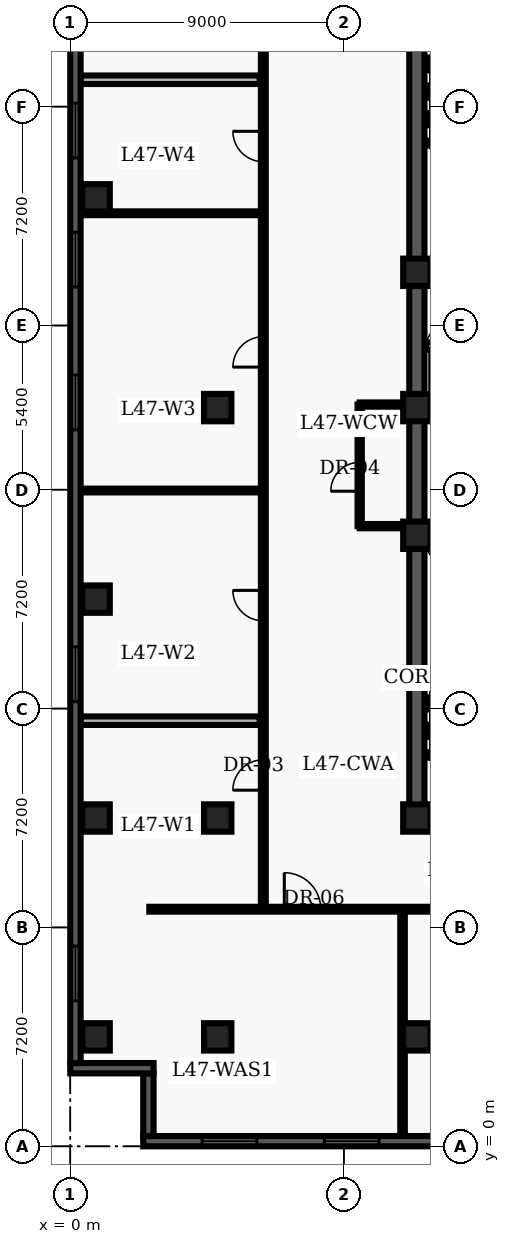
"""IFC4 building model, lengths in metres.
Left out: names, types, materials, properties, quantities, classifications, styles, units other than length and angle.
Written with IfcOpenShell. Run it as: python <this file> out.ifc"""

import sys

from ifc_helpers import new_model, entity, si_unit, converted_unit, direction, frame, origin_with_axes, origin_2d_with_axis, place, context, subcontext, project, spatial, polyline, rectangle, outline, extrude, element, fill, save


model = new_model("IFC4")
c1 = context("Model", 3, precision=1e-05, world=origin_with_axes(), true_north=direction((0.0, 1.0)))
c2 = subcontext(c1, "Body", "Model", "MODEL_VIEW")
j1 = project(units=[si_unit("LENGTHUNIT", "METRE"), converted_unit("PLANEANGLEUNIT", "DEGREE", entity("IfcPlaneAngleMeasure", 0.017), si_unit("PLANEANGLEUNIT", "RADIAN"), dimensions=[0, 0, 0, 0, 0, 0, 0])], contexts=[c1])
p1 = place(None, origin_with_axes())
s1 = spatial("IfcSite", under=j1, at=p1, CompositionType="ELEMENT")
p2 = place(p1, origin_with_axes())
s2 = spatial("IfcBuilding", under=s1, at=p2, CompositionType="ELEMENT")
p3 = place(p2, frame((0.0, 0.0, 192.6), z_axis=(0.0, 0.0, 1.0), x_axis=(1.0, 0.0, 0.0)))
s3 = spatial("IfcBuildingStorey", under=s2, at=p3, CompositionType="ELEMENT", Elevation=192.6)
p4 = place(p3, frame((11.4, 10.8, 0.0), z_axis=(0.0, 0.0, 1.0), x_axis=(0.0, 1.0, 0.0)))
e1 = element("IfcWall", 1, at=p4, inside=s3, PredefinedType="SHEAR", context=c2, shape_type="SweptSolid", body=[
    extrude(outline(polyline([(0.0, -0.25), (27.0, -0.25), (27.0, 0.25), (0.0, 0.25), (0.0, -0.25)])), origin_with_axes(), (0.0, 0.0, 1.0), 3.66),
])
p5 = place(p3, frame((11.4, 10.8, 0.0), z_axis=(0.0, 0.0, 1.0), x_axis=(1.0, 0.0, 0.0)))
e2 = element("IfcWall", 2, at=p5, inside=s3, PredefinedType="SHEAR", context=c2, shape_type="SweptSolid", body=[
    extrude(outline(polyline([(0.0, -0.25), (7.2, -0.25), (7.2, 0.25), (0.0, 0.25), (0.0, -0.25)])), origin_with_axes(), (0.0, 0.0, 1.0), 3.66),
])
p6 = place(p5, frame((2.625, 0.0, 0.0), z_axis=(0.0, 0.0, 1.0), x_axis=(1.0, 0.0, 0.0)))
e3 = element("IfcOpeningElement", 3, at=p6, cuts=e2, PredefinedType="OPENING", context=c2, shape_type="SweptSolid", body=[
    extrude(rectangle(XDim=1.05, YDim=0.52, at=origin_2d_with_axis()), origin_with_axes(), (0.0, 0.0, 1.0), 2.15),
])
for number, where, z_axis, x_axis in (
    (4, (11.65, 19.825, 0.0), (0.0, 0.0, 1.0), (1.0, 0.0, 0.0)),
    (5, (11.65, 28.775, 0.0), (0.0, 0.0, 1.0), (1.0, 0.0, 0.0)),
):
    element("IfcWall", number, at=place(p3, frame(where, z_axis=z_axis, x_axis=x_axis)), inside=s3, PredefinedType="SHEAR", context=c2, shape_type="SweptSolid", body=[
        extrude(outline(polyline([(0.0, -0.125), (6.7, -0.125), (6.7, 0.125), (0.0, 0.125), (0.0, -0.125)])), origin_with_axes(), (0.0, 0.0, 1.0), 3.66),
    ])
p7 = place(p3, frame((11.7, 24.1, 0.0), z_axis=(0.0, 0.0, 1.0), x_axis=(1.0, 0.0, 0.0)))
e6 = element("IfcWall", 6, at=p7, inside=s3, PredefinedType="SOLIDWALL", context=c2, shape_type="SweptSolid", body=[
    extrude(outline(polyline([(0.0, -0.125), (6.6, -0.125), (6.6, 0.125), (0.0, 0.125), (0.0, -0.125)])), origin_with_axes(), (0.0, 0.0, 1.0), 2.7),
])
p8 = place(p7, frame((3.75, 0.0, 0.0), z_axis=(0.0, 0.0, 1.0), x_axis=(1.0, 0.0, 0.0)))
e7 = element("IfcOpeningElement", 7, at=p8, cuts=e6, PredefinedType="OPENING", context=c2, shape_type="SweptSolid", body=[
    extrude(rectangle(XDim=0.9, YDim=0.27, at=origin_2d_with_axis()), origin_with_axes(), (0.0, 0.0, 1.0), 2.15),
])
p9 = place(p3, frame((11.7, 26.325, 0.0), z_axis=(0.0, 0.0, 1.0), x_axis=(1.0, 0.0, 0.0)))
e8 = element("IfcWall", 8, at=p9, inside=s3, PredefinedType="SOLIDWALL", context=c2, shape_type="SweptSolid", body=[
    extrude(outline(polyline([(0.0, -0.125), (6.6, -0.125), (6.6, 0.125), (0.0, 0.125), (0.0, -0.125)])), origin_with_axes(), (0.0, 0.0, 1.0), 2.7),
])
p10 = place(p9, frame((3.5, 0.0, 0.0), z_axis=(0.0, 0.0, 1.0), x_axis=(1.0, 0.0, 0.0)))
e9 = element("IfcOpeningElement", 9, at=p10, cuts=e8, PredefinedType="OPENING", context=c2, shape_type="SweptSolid", body=[
    extrude(rectangle(XDim=0.9, YDim=0.27, at=origin_2d_with_axis()), origin_with_axes(), (0.0, 0.0, 1.0), 2.15),
])
for number, where, z_axis, x_axis in (
    (10, (11.4, 3.6, 0.0), (0.0, 0.0, 1.0), (1.0, 0.0, 0.0)),
    (11, (11.4, 10.8, 0.0), (0.0, 0.0, 1.0), (1.0, 0.0, 0.0)),
    (12, (11.4, 20.1, 0.0), (0.0, 0.0, 1.0), (1.0, 0.0, 0.0)),
    (13, (11.4, 24.3, 0.0), (0.0, 0.0, 1.0), (1.0, 0.0, 0.0)),
    (14, (11.4, 28.75, 0.0), (0.0, 0.0, 1.0), (1.0, 0.0, 0.0)),
    (15, (4.85, 3.6, 0.0), (0.0, 0.0, 1.0), (1.0, 0.0, 0.0)),
    (16, (4.85, 10.8, 0.0), (0.0, 0.0, 1.0), (1.0, 0.0, 0.0)),
    (17, (4.85, 24.3, 0.0), (0.0, 0.0, 1.0), (1.0, 0.0, 0.0)),
    (18, (0.85, 3.6, 0.0), (0.0, 0.0, 1.0), (1.0, 0.0, 0.0)),
    (19, (0.85, 10.8, 0.0), (0.0, 0.0, 1.0), (1.0, 0.0, 0.0)),
    (20, (0.85, 18.0, 0.0), (0.0, 0.0, 1.0), (1.0, 0.0, 0.0)),
    (21, (0.85, 31.2, 0.0), (0.0, 0.0, 1.0), (1.0, 0.0, 0.0)),
):
    element("IfcColumn", number, at=place(p3, frame(where, z_axis=z_axis, x_axis=x_axis)), inside=s3, PredefinedType="COLUMN", context=c2, shape_type="SweptSolid", body=[
        extrude(rectangle(XDim=0.9, YDim=0.9, at=origin_2d_with_axis()), origin_with_axes(), (0.0, 0.0, 1.0), 3.9),
    ])
p11 = place(p3, frame((9.52, 20.4, 0.0), z_axis=(0.0, 0.0, 1.0), x_axis=(0.0, 1.0, 0.0)))
e22 = element("IfcWall", 22, at=p11, inside=s3, PredefinedType="PARTITIONING", context=c2, shape_type="SweptSolid", body=[
    extrude(outline(polyline([(0.0, -0.07), (4.0, -0.07), (4.0, 0.07), (0.0, 0.07), (0.0, -0.07)])), origin_with_axes(), (0.0, 0.0, 1.0), 2.7),
])
p12 = place(p11, frame((1.625, 0.0, 0.0), z_axis=(0.0, 0.0, 1.0), x_axis=(1.0, 0.0, 0.0)))
e23 = element("IfcOpeningElement", 23, at=p12, cuts=e22, PredefinedType="OPENING", context=c2, shape_type="SweptSolid", body=[
    extrude(rectangle(XDim=0.95, YDim=0.16, at=origin_2d_with_axis()), origin_with_axes(), (0.0, 0.0, 1.0), 2.15),
])
for number, where, z_axis, x_axis in (
    (24, (9.52, 20.4, 0.0), (0.0, 0.0, 1.0), (1.0, 0.0, 0.0)),
    (25, (9.52, 24.4, 0.0), (0.0, 0.0, 1.0), (1.0, 0.0, 0.0)),
):
    element("IfcWall", number, at=place(p3, frame(where, z_axis=z_axis, x_axis=x_axis)), inside=s3, PredefinedType="PARTITIONING", context=c2, shape_type="SweptSolid", body=[
        extrude(outline(polyline([(0.0, -0.07), (1.58, -0.07), (1.58, 0.07), (0.0, 0.07), (0.0, -0.07)])), origin_with_axes(), (0.0, 0.0, 1.0), 2.7),
    ])
p13 = place(p3, frame((2.6, 7.8, 0.0), z_axis=(0.0, 0.0, 1.0), x_axis=(1.0, 0.0, 0.0)))
e26 = element("IfcWall", 26, at=p13, inside=s3, PredefinedType="PARTITIONING", context=c2, shape_type="SweptSolid", body=[
    extrude(outline(polyline([(0.0, -0.08), (18.55, -0.08), (18.55, 0.08), (0.0, 0.08), (0.0, -0.08)])), origin_with_axes(), (0.0, 0.0, 1.0), 2.7),
])
p14 = place(p13, frame((5.04, 0.0, 0.0), z_axis=(0.0, 0.0, 1.0), x_axis=(1.0, 0.0, 0.0)))
e27 = element("IfcOpeningElement", 27, at=p14, cuts=e26, PredefinedType="OPENING", context=c2, shape_type="SweptSolid", body=[
    extrude(rectangle(XDim=1.2, YDim=0.18, at=origin_2d_with_axis()), origin_with_axes(), (0.0, 0.0, 1.0), 2.2),
])
p15 = place(p13, frame((13.415, 0.0, 0.0), z_axis=(0.0, 0.0, 1.0), x_axis=(1.0, 0.0, 0.0)))
e28 = element("IfcOpeningElement", 28, at=p15, cuts=e26, PredefinedType="OPENING", context=c2, shape_type="SweptSolid", body=[
    extrude(rectangle(XDim=1.0, YDim=0.18, at=origin_2d_with_axis()), origin_with_axes(), (0.0, 0.0, 1.0), 2.15),
])
p16 = place(p3, frame((6.35, 7.8, 0.0), z_axis=(0.0, 0.0, 1.0), x_axis=(0.0, 1.0, 0.0)))
e29 = element("IfcWall", 29, at=p16, inside=s3, PredefinedType="PARTITIONING", context=c2, shape_type="SweptSolid", body=[
    extrude(outline(polyline([(0.0, -0.08), (32.7, -0.08), (32.7, 0.08), (0.0, 0.08), (0.0, -0.08)])), origin_with_axes(), (0.0, 0.0, 1.0), 2.7),
])
p17 = place(p16, frame((4.415, 0.0, 0.0), z_axis=(0.0, 0.0, 1.0), x_axis=(1.0, 0.0, 0.0)))
e30 = element("IfcOpeningElement", 30, at=p17, cuts=e29, PredefinedType="OPENING", context=c2, shape_type="SweptSolid", body=[
    extrude(rectangle(XDim=1.0, YDim=0.18, at=origin_2d_with_axis()), origin_with_axes(), (0.0, 0.0, 1.0), 2.15),
])
p18 = place(p16, frame((9.986, 0.0, 0.0), z_axis=(0.0, 0.0, 1.0), x_axis=(1.0, 0.0, 0.0)))
e31 = element("IfcOpeningElement", 31, at=p18, cuts=e29, PredefinedType="OPENING", context=c2, shape_type="SweptSolid", body=[
    extrude(rectangle(XDim=1.0, YDim=0.18, at=origin_2d_with_axis()), origin_with_axes(), (0.0, 0.0, 1.0), 2.15),
])
p19 = place(p16, frame((18.332, 0.0, 0.0), z_axis=(0.0, 0.0, 1.0), x_axis=(1.0, 0.0, 0.0)))
e32 = element("IfcOpeningElement", 32, at=p19, cuts=e29, PredefinedType="OPENING", context=c2, shape_type="SweptSolid", body=[
    extrude(rectangle(XDim=1.0, YDim=0.18, at=origin_2d_with_axis()), origin_with_axes(), (0.0, 0.0, 1.0), 2.15),
])
p20 = place(p16, frame((25.088, 0.0, 0.0), z_axis=(0.0, 0.0, 1.0), x_axis=(1.0, 0.0, 0.0)))
e33 = element("IfcOpeningElement", 33, at=p20, cuts=e29, PredefinedType="OPENING", context=c2, shape_type="SweptSolid", body=[
    extrude(rectangle(XDim=1.0, YDim=0.18, at=origin_2d_with_axis()), origin_with_axes(), (0.0, 0.0, 1.0), 2.15),
])
p21 = place(p16, frame((31.177, 0.0, 0.0), z_axis=(0.0, 0.0, 1.0), x_axis=(1.0, 0.0, 0.0)))
e34 = element("IfcOpeningElement", 34, at=p21, cuts=e29, PredefinedType="OPENING", context=c2, shape_type="SweptSolid", body=[
    extrude(rectangle(XDim=1.0, YDim=0.18, at=origin_2d_with_axis()), origin_with_axes(), (0.0, 0.0, 1.0), 2.15),
])
p22 = place(p3, frame((0.335, 14.001, 0.0), z_axis=(0.0, 0.0, 1.0), x_axis=(1.0, 0.0, 0.0)))
e35 = element("IfcWall", 35, at=p22, inside=s3, PredefinedType="PARTITIONING", context=c2, shape_type="SweptSolid", body=[
    extrude(outline(polyline([(0.0, -0.14), (5.895, -0.14), (5.895, 0.14), (0.0, 0.14), (0.0, -0.14)])), origin_with_axes(), (0.0, 0.0, 1.0), 2.7),
])
for number, where, z_axis, x_axis in (
    (36, (0.335, 21.572, 0.0), (0.0, 0.0, 1.0), (1.0, 0.0, 0.0)),
    (37, (0.335, 30.692, 0.0), (0.0, 0.0, 1.0), (1.0, 0.0, 0.0)),
):
    element("IfcWall", number, at=place(p3, frame(where, z_axis=z_axis, x_axis=x_axis)), inside=s3, PredefinedType="PARTITIONING", context=c2, shape_type="SweptSolid", body=[
        extrude(outline(polyline([(0.0, -0.062), (5.895, -0.062), (5.895, 0.062), (0.0, 0.062), (0.0, -0.062)])), origin_with_axes(), (0.0, 0.0, 1.0), 2.7),
    ])
p23 = place(p3, frame((0.335, 35.084, 0.0), z_axis=(0.0, 0.0, 1.0), x_axis=(1.0, 0.0, 0.0)))
e38 = element("IfcWall", 38, at=p23, inside=s3, PredefinedType="PARTITIONING", context=c2, shape_type="SweptSolid", body=[
    extrude(outline(polyline([(0.0, -0.14), (5.895, -0.14), (5.895, 0.14), (0.0, 0.14), (0.0, -0.14)])), origin_with_axes(), (0.0, 0.0, 1.0), 2.7),
])
p24 = place(p3, frame((10.929, 0.335, 0.0), z_axis=(0.0, 0.0, 1.0), x_axis=(0.0, 1.0, 0.0)))
e39 = element("IfcWall", 39, at=p24, inside=s3, PredefinedType="PARTITIONING", context=c2, shape_type="SweptSolid", body=[
    extrude(outline(polyline([(0.0, -0.075), (7.365, -0.075), (7.365, 0.075), (0.0, 0.075), (0.0, -0.075)])), origin_with_axes(), (0.0, 0.0, 1.0), 2.7),
])
p25 = place(p3, frame((57.26, 0.17, 0.0), z_axis=(0.0, 0.0, 1.0), x_axis=(-1.0, 0.0, 0.0)))
e40 = element("IfcWall", 40, at=p25, inside=s3, PredefinedType="SOLIDWALL", context=c2, shape_type="SweptSolid", body=[
    extrude(outline(polyline([(0.0, -0.17), (54.86, -0.17), (54.86, 0.17), (0.0, 0.17), (0.0, -0.17)])), origin_with_axes(), (0.0, 0.0, 1.0), 3.66),
])
p26 = place(p25, frame((2.836, 0.0, 0.45), z_axis=(0.0, 0.0, 1.0), x_axis=(1.0, 0.0, 0.0)))
e41 = element("IfcOpeningElement", 41, at=p26, cuts=e40, PredefinedType="OPENING", context=c2, shape_type="SweptSolid", body=[
    extrude(rectangle(XDim=1.8, YDim=0.36, at=origin_2d_with_axis()), origin_with_axes(), (0.0, 0.0, 1.0), 2.1),
])
p27 = place(p25, frame((7.307, 0.0, 0.45), z_axis=(0.0, 0.0, 1.0), x_axis=(1.0, 0.0, 0.0)))
e42 = element("IfcOpeningElement", 42, at=p27, cuts=e40, PredefinedType="OPENING", context=c2, shape_type="SweptSolid", body=[
    extrude(rectangle(XDim=1.8, YDim=0.36, at=origin_2d_with_axis()), origin_with_axes(), (0.0, 0.0, 1.0), 2.1),
])
p28 = place(p25, frame((11.779, 0.0, 0.45), z_axis=(0.0, 0.0, 1.0), x_axis=(1.0, 0.0, 0.0)))
e43 = element("IfcOpeningElement", 43, at=p28, cuts=e40, PredefinedType="OPENING", context=c2, shape_type="SweptSolid", body=[
    extrude(rectangle(XDim=1.8, YDim=0.36, at=origin_2d_with_axis()), origin_with_axes(), (0.0, 0.0, 1.0), 2.1),
])
p29 = place(p25, frame((16.251, 0.0, 0.45), z_axis=(0.0, 0.0, 1.0), x_axis=(1.0, 0.0, 0.0)))
e44 = element("IfcOpeningElement", 44, at=p29, cuts=e40, PredefinedType="OPENING", context=c2, shape_type="SweptSolid", body=[
    extrude(rectangle(XDim=1.8, YDim=0.36, at=origin_2d_with_axis()), origin_with_axes(), (0.0, 0.0, 1.0), 2.1),
])
p30 = place(p25, frame((20.723, 0.0, 0.45), z_axis=(0.0, 0.0, 1.0), x_axis=(1.0, 0.0, 0.0)))
e45 = element("IfcOpeningElement", 45, at=p30, cuts=e40, PredefinedType="OPENING", context=c2, shape_type="SweptSolid", body=[
    extrude(rectangle(XDim=1.8, YDim=0.36, at=origin_2d_with_axis()), origin_with_axes(), (0.0, 0.0, 1.0), 2.1),
])
p31 = place(p25, frame((34.588, 0.0, 0.45), z_axis=(0.0, 0.0, 1.0), x_axis=(1.0, 0.0, 0.0)))
e46 = element("IfcOpeningElement", 46, at=p31, cuts=e40, PredefinedType="OPENING", context=c2, shape_type="SweptSolid", body=[
    extrude(rectangle(XDim=1.8, YDim=0.36, at=origin_2d_with_axis()), origin_with_axes(), (0.0, 0.0, 1.0), 2.1),
])
p32 = place(p25, frame((38.609, 0.0, 0.45), z_axis=(0.0, 0.0, 1.0), x_axis=(1.0, 0.0, 0.0)))
e47 = element("IfcOpeningElement", 47, at=p32, cuts=e40, PredefinedType="OPENING", context=c2, shape_type="SweptSolid", body=[
    extrude(rectangle(XDim=1.8, YDim=0.36, at=origin_2d_with_axis()), origin_with_axes(), (0.0, 0.0, 1.0), 2.1),
])
p33 = place(p25, frame((43.081, 0.0, 0.45), z_axis=(0.0, 0.0, 1.0), x_axis=(1.0, 0.0, 0.0)))
e48 = element("IfcOpeningElement", 48, at=p33, cuts=e40, PredefinedType="OPENING", context=c2, shape_type="SweptSolid", body=[
    extrude(rectangle(XDim=1.8, YDim=0.36, at=origin_2d_with_axis()), origin_with_axes(), (0.0, 0.0, 1.0), 2.1),
])
p34 = place(p25, frame((48.003, 0.0, 0.45), z_axis=(0.0, 0.0, 1.0), x_axis=(1.0, 0.0, 0.0)))
e49 = element("IfcOpeningElement", 49, at=p34, cuts=e40, PredefinedType="OPENING", context=c2, shape_type="SweptSolid", body=[
    extrude(rectangle(XDim=1.8, YDim=0.36, at=origin_2d_with_axis()), origin_with_axes(), (0.0, 0.0, 1.0), 2.1),
])
p35 = place(p25, frame((52.024, 0.0, 0.45), z_axis=(0.0, 0.0, 1.0), x_axis=(1.0, 0.0, 0.0)))
e50 = element("IfcOpeningElement", 50, at=p35, cuts=e40, PredefinedType="OPENING", context=c2, shape_type="SweptSolid", body=[
    extrude(rectangle(XDim=1.8, YDim=0.36, at=origin_2d_with_axis()), origin_with_axes(), (0.0, 0.0, 1.0), 2.1),
])
p36 = place(p3, frame((2.57, 0.34, 0.0), z_axis=(0.0, 0.0, 1.0), x_axis=(0.0, 1.0, 0.0)))
e51 = element("IfcWall", 51, at=p36, inside=s3, PredefinedType="SOLIDWALL", context=c2, shape_type="SweptSolid", body=[
    extrude(outline(polyline([(0.0, -0.17), (2.06, -0.17), (2.06, 0.17), (0.0, 0.17), (0.0, -0.17)])), origin_with_axes(), (0.0, 0.0, 1.0), 3.66),
])
p37 = place(p3, frame((2.74, 2.57, 0.0), z_axis=(0.0, 0.0, 1.0), x_axis=(-1.0, 0.0, 0.0)))
e52 = element("IfcWall", 52, at=p37, inside=s3, PredefinedType="SOLIDWALL", context=c2, shape_type="SweptSolid", body=[
    extrude(outline(polyline([(0.0, -0.17), (2.74, -0.17), (2.74, 0.17), (0.0, 0.17), (0.0, -0.17)])), origin_with_axes(), (0.0, 0.0, 1.0), 3.66),
])
p38 = place(p3, frame((0.17, 2.74, 0.0), z_axis=(0.0, 0.0, 1.0), x_axis=(0.0, 1.0, 0.0)))
e53 = element("IfcWall", 53, at=p38, inside=s3, PredefinedType="SOLIDWALL", context=c2, shape_type="SweptSolid", body=[
    extrude(outline(polyline([(0.0, -0.17), (43.46, -0.17), (43.46, 0.17), (0.0, 0.17), (0.0, -0.17)])), origin_with_axes(), (0.0, 0.0, 1.0), 3.66),
])
p39 = place(p38, frame((2.948, 0.0, 0.45), z_axis=(0.0, 0.0, 1.0), x_axis=(1.0, 0.0, 0.0)))
e54 = element("IfcOpeningElement", 54, at=p39, cuts=e53, PredefinedType="OPENING", context=c2, shape_type="SweptSolid", body=[
    extrude(rectangle(XDim=1.8, YDim=0.36, at=origin_2d_with_axis()), origin_with_axes(), (0.0, 0.0, 1.0), 2.1),
])
p40 = place(p38, frame((12.789, 0.0, 0.45), z_axis=(0.0, 0.0, 1.0), x_axis=(1.0, 0.0, 0.0)))
e55 = element("IfcOpeningElement", 55, at=p40, cuts=e53, PredefinedType="OPENING", context=c2, shape_type="SweptSolid", body=[
    extrude(rectangle(XDim=1.8, YDim=0.36, at=origin_2d_with_axis()), origin_with_axes(), (0.0, 0.0, 1.0), 2.1),
])
p41 = place(p38, frame((21.73, 0.0, 0.45), z_axis=(0.0, 0.0, 1.0), x_axis=(1.0, 0.0, 0.0)))
e56 = element("IfcOpeningElement", 56, at=p41, cuts=e53, PredefinedType="OPENING", context=c2, shape_type="SweptSolid", body=[
    extrude(rectangle(XDim=1.8, YDim=0.36, at=origin_2d_with_axis()), origin_with_axes(), (0.0, 0.0, 1.0), 2.1),
])
p42 = place(p38, frame((26.426, 0.0, 0.45), z_axis=(0.0, 0.0, 1.0), x_axis=(1.0, 0.0, 0.0)))
e57 = element("IfcOpeningElement", 57, at=p42, cuts=e53, PredefinedType="OPENING", context=c2, shape_type="SweptSolid", body=[
    extrude(rectangle(XDim=1.8, YDim=0.36, at=origin_2d_with_axis()), origin_with_axes(), (0.0, 0.0, 1.0), 2.1),
])
p43 = place(p38, frame((30.671, 0.0, 0.45), z_axis=(0.0, 0.0, 1.0), x_axis=(1.0, 0.0, 0.0)))
e58 = element("IfcOpeningElement", 58, at=p43, cuts=e53, PredefinedType="OPENING", context=c2, shape_type="SweptSolid", body=[
    extrude(rectangle(XDim=1.8, YDim=0.36, at=origin_2d_with_axis()), origin_with_axes(), (0.0, 0.0, 1.0), 2.1),
])
p44 = place(p38, frame((40.062, 0.0, 0.45), z_axis=(0.0, 0.0, 1.0), x_axis=(1.0, 0.0, 0.0)))
e59 = element("IfcOpeningElement", 59, at=p44, cuts=e53, PredefinedType="OPENING", context=c2, shape_type="SweptSolid", body=[
    extrude(rectangle(XDim=1.8, YDim=0.36, at=origin_2d_with_axis()), origin_with_axes(), (0.0, 0.0, 1.0), 2.1),
])
p45 = place(p11, frame((1.625, 0.0, 0.0), z_axis=(0.0, 0.0, 1.0), x_axis=(1.0, 0.0, 0.0)))
e60 = element("IfcDoor", 60, at=p45, inside=s3, OperationType="SINGLE_SWING_LEFT", PredefinedType="DOOR", context=c2, shape_type="SweptSolid", body=[
    extrude(rectangle(XDim=0.95, YDim=0.084, at=origin_2d_with_axis()), origin_with_axes(), (0.0, 0.0, 1.0), 2.15),
])
fill(e23, e60)
p46 = place(p16, frame((4.415, 0.0, 0.0), z_axis=(0.0, 0.0, 1.0), x_axis=(1.0, 0.0, 0.0)))
e61 = element("IfcDoor", 61, at=p46, inside=s3, OperationType="SINGLE_SWING_LEFT", PredefinedType="DOOR", context=c2, shape_type="SweptSolid", body=[
    extrude(rectangle(XDim=1.0, YDim=0.09, at=origin_2d_with_axis()), origin_with_axes(), (0.0, 0.0, 1.0), 2.15),
])
fill(e30, e61)
p47 = place(p16, frame((9.986, 0.0, 0.0), z_axis=(0.0, 0.0, 1.0), x_axis=(1.0, 0.0, 0.0)))
e62 = element("IfcDoor", 62, at=p47, inside=s3, OperationType="SINGLE_SWING_RIGHT", PredefinedType="DOOR", context=c2, shape_type="SweptSolid", body=[
    extrude(rectangle(XDim=1.0, YDim=0.09, at=origin_2d_with_axis()), origin_with_axes(), (0.0, 0.0, 1.0), 2.15),
])
fill(e31, e62)
p48 = place(p16, frame((18.332, 0.0, 0.0), z_axis=(0.0, 0.0, 1.0), x_axis=(1.0, 0.0, 0.0)))
e63 = element("IfcDoor", 63, at=p48, inside=s3, OperationType="SINGLE_SWING_LEFT", PredefinedType="DOOR", context=c2, shape_type="SweptSolid", body=[
    extrude(rectangle(XDim=1.0, YDim=0.09, at=origin_2d_with_axis()), origin_with_axes(), (0.0, 0.0, 1.0), 2.15),
])
fill(e32, e63)
p49 = place(p16, frame((25.088, 0.0, 0.0), z_axis=(0.0, 0.0, 1.0), x_axis=(1.0, 0.0, 0.0)))
e64 = element("IfcDoor", 64, at=p49, inside=s3, OperationType="SINGLE_SWING_RIGHT", PredefinedType="DOOR", context=c2, shape_type="SweptSolid", body=[
    extrude(rectangle(XDim=1.0, YDim=0.09, at=origin_2d_with_axis()), origin_with_axes(), (0.0, 0.0, 1.0), 2.15),
])
fill(e33, e64)
p50 = place(p13, frame((5.04, 0.0, 0.0), z_axis=(0.0, 0.0, 1.0), x_axis=(1.0, 0.0, 0.0)))
e65 = element("IfcDoor", 65, at=p50, inside=s3, OperationType="SINGLE_SWING_LEFT", PredefinedType="DOOR", context=c2, shape_type="SweptSolid", body=[
    extrude(rectangle(XDim=1.2, YDim=0.09, at=origin_2d_with_axis()), origin_with_axes(), (0.0, 0.0, 1.0), 2.2),
])
fill(e27, e65)
p51 = place(p25, frame((48.003, 0.0, 0.45), z_axis=(0.0, 0.0, 1.0), x_axis=(1.0, 0.0, 0.0)))
e66 = element("IfcWindow", 66, at=p51, inside=s3, PredefinedType="WINDOW", context=c2, shape_type="SweptSolid", body=[
    extrude(rectangle(XDim=1.8, YDim=0.09, at=origin_2d_with_axis()), origin_with_axes(), (0.0, 0.0, 1.0), 2.1),
])
fill(e49, e66)
p52 = place(p25, frame((52.024, 0.0, 0.45), z_axis=(0.0, 0.0, 1.0), x_axis=(1.0, 0.0, 0.0)))
e67 = element("IfcWindow", 67, at=p52, inside=s3, PredefinedType="WINDOW", context=c2, shape_type="SweptSolid", body=[
    extrude(rectangle(XDim=1.8, YDim=0.09, at=origin_2d_with_axis()), origin_with_axes(), (0.0, 0.0, 1.0), 2.1),
])
fill(e50, e67)
p53 = place(p38, frame((2.948, 0.0, 0.45), z_axis=(0.0, 0.0, 1.0), x_axis=(1.0, 0.0, 0.0)))
e68 = element("IfcWindow", 68, at=p53, inside=s3, PredefinedType="WINDOW", context=c2, shape_type="SweptSolid", body=[
    extrude(rectangle(XDim=1.8, YDim=0.09, at=origin_2d_with_axis()), origin_with_axes(), (0.0, 0.0, 1.0), 2.1),
])
fill(e54, e68)
p54 = place(p38, frame((12.789, 0.0, 0.45), z_axis=(0.0, 0.0, 1.0), x_axis=(1.0, 0.0, 0.0)))
e69 = element("IfcWindow", 69, at=p54, inside=s3, PredefinedType="WINDOW", context=c2, shape_type="SweptSolid", body=[
    extrude(rectangle(XDim=1.8, YDim=0.09, at=origin_2d_with_axis()), origin_with_axes(), (0.0, 0.0, 1.0), 2.1),
])
fill(e55, e69)
p55 = place(p38, frame((21.73, 0.0, 0.45), z_axis=(0.0, 0.0, 1.0), x_axis=(1.0, 0.0, 0.0)))
e70 = element("IfcWindow", 70, at=p55, inside=s3, PredefinedType="WINDOW", context=c2, shape_type="SweptSolid", body=[
    extrude(rectangle(XDim=1.8, YDim=0.09, at=origin_2d_with_axis()), origin_with_axes(), (0.0, 0.0, 1.0), 2.1),
])
fill(e56, e70)
p56 = place(p38, frame((26.426, 0.0, 0.45), z_axis=(0.0, 0.0, 1.0), x_axis=(1.0, 0.0, 0.0)))
e71 = element("IfcWindow", 71, at=p56, inside=s3, PredefinedType="WINDOW", context=c2, shape_type="SweptSolid", body=[
    extrude(rectangle(XDim=1.8, YDim=0.09, at=origin_2d_with_axis()), origin_with_axes(), (0.0, 0.0, 1.0), 2.1),
])
fill(e57, e71)
p57 = place(p38, frame((30.671, 0.0, 0.45), z_axis=(0.0, 0.0, 1.0), x_axis=(1.0, 0.0, 0.0)))
e72 = element("IfcWindow", 72, at=p57, inside=s3, PredefinedType="WINDOW", context=c2, shape_type="SweptSolid", body=[
    extrude(rectangle(XDim=1.8, YDim=0.09, at=origin_2d_with_axis()), origin_with_axes(), (0.0, 0.0, 1.0), 2.1),
])
fill(e58, e72)
save(model, sys.argv[1])
